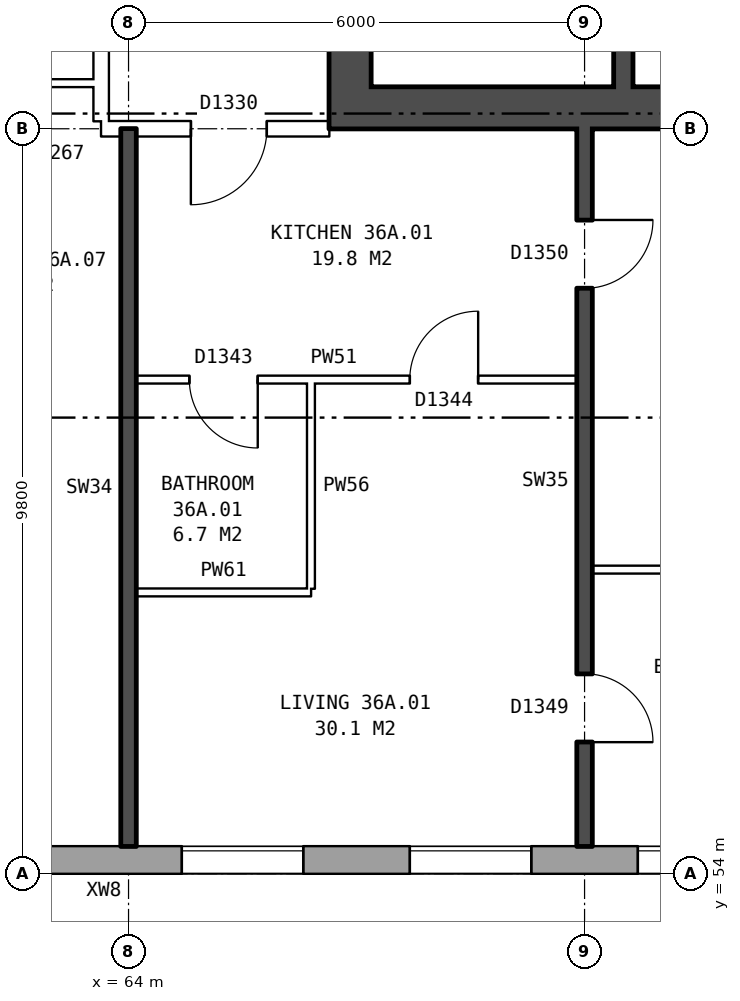
"""IFC4 building model, lengths in metres.
Left out: names, types, materials, properties, quantities, classifications, styles, units other than length and angle.
Written with IfcOpenShell. Run it as: python <this file> out.ifc"""

import sys

from ifc_helpers import new_model, si_unit, direction, frame, frame_2d, origin, place, context, subcontext, project, spatial, rectangle, extrude, element, fill, save


model = new_model("IFC4")
c1 = context("Model", 3, precision=1e-05, world=origin(), true_north=direction((0.0, 1.0)))
c2 = subcontext(c1, "Body", "Model", "MODEL_VIEW")
j1 = project(units=[si_unit("LENGTHUNIT", "METRE"), si_unit("PLANEANGLEUNIT", "RADIAN")], contexts=[c1])
p1 = place(None, origin())
s1 = spatial("IfcSite", under=j1, at=p1, CompositionType="ELEMENT")
p2 = place(p1, origin())
s2 = spatial("IfcBuilding", under=s1, at=p2, CompositionType="ELEMENT")
p3 = place(p2, frame((0.0, 0.0, 129.9)))
s3 = spatial("IfcBuildingStorey", under=s2, at=p3, CompositionType="ELEMENT", Elevation=129.9)
p4 = place(p3, frame((29.825, 54.18, 0.0), z_axis=(0.0, 0.0, 1.0), x_axis=(1.0, 0.0, 0.0)))
e1 = element("IfcWall", 1, at=p4, inside=s3, PredefinedType="STANDARD", context=c2, shape_type="SweptSolid", body=[
    extrude(rectangle(XDim=43.101, YDim=0.36, at=frame_2d((21.55, 0.0))), origin(), (0.0, 0.0, 1.0), 2.85),
])
p5 = place(p4, frame((1.875, 0.0, 0.8)))
e2 = element("IfcOpeningElement", 2, at=p5, cuts=e1, PredefinedType="OPENING", context=c2, shape_type="SweptSolid", body=[
    extrude(rectangle(XDim=1.6, YDim=1.8, at=frame_2d((0.8, 0.9))), frame((0.0, 0.19, 0.0), z_axis=(0.0, -1.0, 0.0), x_axis=(1.0, 0.0, 0.0)), (0.0, 0.0, 1.0), 0.38),
])
p6 = place(p4, frame((4.875, 0.0, 0.8)))
e3 = element("IfcOpeningElement", 3, at=p6, cuts=e1, PredefinedType="OPENING", context=c2, shape_type="SweptSolid", body=[
    extrude(rectangle(XDim=1.6, YDim=1.8, at=frame_2d((0.8, 0.9))), frame((0.0, 0.19, 0.0), z_axis=(0.0, -1.0, 0.0), x_axis=(1.0, 0.0, 0.0)), (0.0, 0.0, 1.0), 0.38),
])
p7 = place(p4, frame((6.775, 0.0, 0.8)))
e4 = element("IfcOpeningElement", 4, at=p7, cuts=e1, PredefinedType="OPENING", context=c2, shape_type="SweptSolid", body=[
    extrude(rectangle(XDim=1.6, YDim=1.8, at=frame_2d((0.8, 0.9))), frame((0.0, 0.19, 0.0), z_axis=(0.0, -1.0, 0.0), x_axis=(1.0, 0.0, 0.0)), (0.0, 0.0, 1.0), 0.38),
])
p8 = place(p4, frame((10.875, 0.0, 0.8)))
e5 = element("IfcOpeningElement", 5, at=p8, cuts=e1, PredefinedType="OPENING", context=c2, shape_type="SweptSolid", body=[
    extrude(rectangle(XDim=0.8, YDim=0.9, at=frame_2d((0.4, 0.45))), frame((0.0, 0.19, 0.0), z_axis=(0.0, -1.0, 0.0), x_axis=(1.0, 0.0, 0.0)), (0.0, 0.0, 1.0), 0.38),
])
p9 = place(p4, frame((13.875, 0.0, 0.8)))
e6 = element("IfcOpeningElement", 6, at=p9, cuts=e1, PredefinedType="OPENING", context=c2, shape_type="SweptSolid", body=[
    extrude(rectangle(XDim=1.6, YDim=1.8, at=frame_2d((0.8, 0.9))), frame((0.0, 0.19, 0.0), z_axis=(0.0, -1.0, 0.0), x_axis=(1.0, 0.0, 0.0)), (0.0, 0.0, 1.0), 0.38),
])
p10 = place(p4, frame((16.875, 0.0, 0.8)))
e7 = element("IfcOpeningElement", 7, at=p10, cuts=e1, PredefinedType="OPENING", context=c2, shape_type="SweptSolid", body=[
    extrude(rectangle(XDim=1.6, YDim=1.8, at=frame_2d((0.8, 0.9))), frame((0.0, 0.19, 0.0), z_axis=(0.0, -1.0, 0.0), x_axis=(1.0, 0.0, 0.0)), (0.0, 0.0, 1.0), 0.38),
])
p11 = place(p4, frame((19.875, 0.0, 0.8)))
e8 = element("IfcOpeningElement", 8, at=p11, cuts=e1, PredefinedType="OPENING", context=c2, shape_type="SweptSolid", body=[
    extrude(rectangle(XDim=1.6, YDim=1.8, at=frame_2d((0.8, 0.9))), frame((0.0, 0.19, 0.0), z_axis=(0.0, -1.0, 0.0), x_axis=(1.0, 0.0, 0.0)), (0.0, 0.0, 1.0), 0.38),
])
p12 = place(p4, frame((22.875, 0.0, 0.8)))
e9 = element("IfcOpeningElement", 9, at=p12, cuts=e1, PredefinedType="OPENING", context=c2, shape_type="SweptSolid", body=[
    extrude(rectangle(XDim=1.6, YDim=1.8, at=frame_2d((0.8, 0.9))), frame((0.0, 0.19, 0.0), z_axis=(0.0, -1.0, 0.0), x_axis=(1.0, 0.0, 0.0)), (0.0, 0.0, 1.0), 0.38),
])
p13 = place(p4, frame((25.875, 0.0, 0.8)))
e10 = element("IfcOpeningElement", 10, at=p13, cuts=e1, PredefinedType="OPENING", context=c2, shape_type="SweptSolid", body=[
    extrude(rectangle(XDim=1.6, YDim=1.8, at=frame_2d((0.8, 0.9))), frame((0.0, 0.19, 0.0), z_axis=(0.0, -1.0, 0.0), x_axis=(1.0, 0.0, 0.0)), (0.0, 0.0, 1.0), 0.38),
])
p14 = place(p4, frame((28.875, 0.0, 0.8)))
e11 = element("IfcOpeningElement", 11, at=p14, cuts=e1, PredefinedType="OPENING", context=c2, shape_type="SweptSolid", body=[
    extrude(rectangle(XDim=1.6, YDim=1.8, at=frame_2d((0.8, 0.9))), frame((0.0, 0.19, 0.0), z_axis=(0.0, -1.0, 0.0), x_axis=(1.0, 0.0, 0.0)), (0.0, 0.0, 1.0), 0.38),
])
p15 = place(p4, frame((31.325, 0.0, 0.15)))
e12 = element("IfcOpeningElement", 12, at=p15, cuts=e1, PredefinedType="OPENING", context=c2, shape_type="SweptSolid", body=[
    extrude(rectangle(XDim=0.6, YDim=1.8, at=frame_2d((0.3, 0.9))), frame((0.0, 0.19, 0.0), z_axis=(0.0, -1.0, 0.0), x_axis=(1.0, 0.0, 0.0)), (0.0, 0.0, 1.0), 0.38),
])
p16 = place(p4, frame((34.875, 0.0, 0.8)))
e13 = element("IfcOpeningElement", 13, at=p16, cuts=e1, PredefinedType="OPENING", context=c2, shape_type="SweptSolid", body=[
    extrude(rectangle(XDim=1.6, YDim=1.8, at=frame_2d((0.8, 0.9))), frame((0.0, 0.19, 0.0), z_axis=(0.0, -1.0, 0.0), x_axis=(1.0, 0.0, 0.0)), (0.0, 0.0, 1.0), 0.38),
])
p17 = place(p4, frame((37.875, 0.0, 0.8)))
e14 = element("IfcOpeningElement", 14, at=p17, cuts=e1, PredefinedType="OPENING", context=c2, shape_type="SweptSolid", body=[
    extrude(rectangle(XDim=1.6, YDim=1.8, at=frame_2d((0.8, 0.9))), frame((0.0, 0.19, 0.0), z_axis=(0.0, -1.0, 0.0), x_axis=(1.0, 0.0, 0.0)), (0.0, 0.0, 1.0), 0.38),
])
p18 = place(p4, frame((40.875, 0.0, 0.8)))
e15 = element("IfcOpeningElement", 15, at=p18, cuts=e1, PredefinedType="OPENING", context=c2, shape_type="SweptSolid", body=[
    extrude(rectangle(XDim=1.6, YDim=1.8, at=frame_2d((0.8, 0.9))), frame((0.0, 0.19, 0.0), z_axis=(0.0, -1.0, 0.0), x_axis=(1.0, 0.0, 0.0)), (0.0, 0.0, 1.0), 0.38),
])
p19 = place(p4, frame((8.675, 0.0, 1.3)))
e16 = element("IfcOpeningElement", 16, at=p19, cuts=e1, PredefinedType="OPENING", context=c2, shape_type="SweptSolid", body=[
    extrude(rectangle(XDim=0.6, YDim=1.2, at=frame_2d((0.3, 0.6))), frame((0.0, 0.19, 0.0), z_axis=(0.0, -1.0, 0.0), x_axis=(1.0, 0.0, 0.0)), (0.0, 0.0, 1.0), 0.38),
])
p20 = place(p4, frame((11.975, 0.0, 0.8)))
e17 = element("IfcOpeningElement", 17, at=p20, cuts=e1, PredefinedType="OPENING", context=c2, shape_type="SweptSolid", body=[
    extrude(rectangle(XDim=1.6, YDim=1.8, at=frame_2d((0.8, 0.9))), frame((0.0, 0.19, 0.0), z_axis=(0.0, -1.0, 0.0), x_axis=(1.0, 0.0, 0.0)), (0.0, 0.0, 1.0), 0.38),
])
p21 = place(p4, frame((32.225, 0.0, 0.25)))
e18 = element("IfcOpeningElement", 18, at=p21, cuts=e1, PredefinedType="OPENING", context=c2, shape_type="SweptSolid", body=[
    extrude(rectangle(XDim=0.6, YDim=0.9, at=frame_2d((0.3, 0.45))), frame((0.0, 0.19, 0.0), z_axis=(0.0, -1.0, 0.0), x_axis=(1.0, 0.0, 0.0)), (0.0, 0.0, 1.0), 0.38),
])
p22 = place(p3, frame((66.915, 63.8, 0.0), z_axis=(0.0, 0.0, 1.0), x_axis=(0.0, 1.0, 0.0)))
e19 = element("IfcWall", 19, at=p22, inside=s3, PredefinedType="SHEAR", context=c2, shape_type="SweptSolid", body=[
    extrude(rectangle(XDim=12.4, YDim=0.55, at=frame_2d((6.2, 0.0))), origin(), (0.0, 0.0, 1.0), 2.85),
])
p23 = place(p22, frame((1.325, 0.0, 0.0)))
e20 = element("IfcOpeningElement", 20, at=p23, cuts=e19, PredefinedType="OPENING", context=c2, shape_type="SweptSolid", body=[
    extrude(rectangle(XDim=1.1, YDim=2.1, at=frame_2d((0.55, 1.05))), frame((0.0, 0.285, 0.0), z_axis=(0.0, -1.0, 0.0), x_axis=(1.0, 0.0, 0.0)), (0.0, 0.0, 1.0), 0.57),
])
p24 = place(p22, frame((3.6, 0.0, 0.0)))
e21 = element("IfcOpeningElement", 21, at=p24, cuts=e19, PredefinedType="OPENING", context=c2, shape_type="SweptSolid", body=[
    extrude(rectangle(XDim=1.1, YDim=2.1, at=frame_2d((0.55, 1.05))), frame((0.0, 0.285, 0.0), z_axis=(0.0, -1.0, 0.0), x_axis=(1.0, 0.0, 0.0)), (0.0, 0.0, 1.0), 0.57),
])
p25 = place(p22, frame((5.8, 0.0, 0.0)))
e22 = element("IfcOpeningElement", 22, at=p25, cuts=e19, PredefinedType="OPENING", context=c2, shape_type="SweptSolid", body=[
    extrude(rectangle(XDim=1.1, YDim=2.1, at=frame_2d((0.55, 1.05))), frame((0.0, 0.285, 0.0), z_axis=(0.0, -1.0, 0.0), x_axis=(1.0, 0.0, 0.0)), (0.0, 0.0, 1.0), 0.57),
])
p26 = place(p22, frame((8.0, 0.0, 0.0)))
e23 = element("IfcOpeningElement", 23, at=p26, cuts=e19, PredefinedType="OPENING", context=c2, shape_type="SweptSolid", body=[
    extrude(rectangle(XDim=1.1, YDim=2.1, at=frame_2d((0.55, 1.05))), frame((0.0, 0.285, 0.0), z_axis=(0.0, -1.0, 0.0), x_axis=(1.0, 0.0, 0.0)), (0.0, 0.0, 1.0), 0.57),
])
p27 = place(p22, frame((9.9, 0.0, 0.0)))
e24 = element("IfcOpeningElement", 24, at=p27, cuts=e19, PredefinedType="OPENING", context=c2, shape_type="SweptSolid", body=[
    extrude(rectangle(XDim=1.1, YDim=2.1, at=frame_2d((0.55, 1.05))), frame((0.0, 0.285, 0.0), z_axis=(0.0, -1.0, 0.0), x_axis=(1.0, 0.0, 0.0)), (0.0, 0.0, 1.0), 0.57),
])
p28 = place(p3, frame((67.19, 64.075, 0.0), z_axis=(0.0, 0.0, 1.0), x_axis=(1.0, 0.0, 0.0)))
e25 = element("IfcWall", 25, at=p28, inside=s3, PredefinedType="SHEAR", context=c2, shape_type="SweptSolid", body=[
    extrude(rectangle(XDim=7.9, YDim=0.55, at=frame_2d((3.95, 0.0))), origin(), (0.0, 0.0, 1.0), 2.85),
])
p29 = place(p3, frame((70.51, 64.35, 0.0), z_axis=(0.0, 0.0, 1.0), x_axis=(0.0, 1.0, 0.0)))
e26 = element("IfcWall", 26, at=p29, inside=s3, PredefinedType="SHEAR", context=c2, shape_type="SweptSolid", body=[
    extrude(rectangle(XDim=2.375, YDim=0.25, at=frame_2d((1.188, 0.0))), origin(), (0.0, 0.0, 1.0), 2.85),
])
p30 = place(p3, frame((63.64, 63.9, 0.0), z_axis=(0.0, 0.0, 1.0), x_axis=(0.0, 1.0, 0.0)))
e27 = element("IfcWall", 27, at=p30, inside=s3, PredefinedType="PARTITIONING", context=c2, shape_type="SweptSolid", body=[
    extrude(rectangle(XDim=12.2, YDim=0.2, at=frame_2d((6.1, 0.0))), origin(), (0.0, 0.0, 1.0), 2.85),
])
p31 = place(p30, frame((5.1, 0.0, 0.0)))
e28 = element("IfcOpeningElement", 28, at=p31, cuts=e27, PredefinedType="OPENING", context=c2, shape_type="SweptSolid", body=[
    extrude(rectangle(XDim=2.0, YDim=2.1, at=frame_2d((1.0, 1.05))), frame((0.0, 0.11, 0.0), z_axis=(0.0, -1.0, 0.0), x_axis=(1.0, 0.0, 0.0)), (0.0, 0.0, 1.0), 0.22),
])
p32 = place(p3, frame((64.1, 57.7, 0.0), z_axis=(0.0, 0.0, 1.0), x_axis=(1.0, 0.0, 0.0)))
e29 = element("IfcWall", 29, at=p32, inside=s3, PredefinedType="PARTITIONING", context=c2, shape_type="SweptSolid", body=[
    extrude(rectangle(XDim=2.3, YDim=0.1, at=frame_2d((1.15, 0.0))), origin(), (0.0, 0.0, 1.0), 2.85),
])
p33 = place(p3, frame((70.1, 58.0, 0.0), z_axis=(0.0, 0.0, 1.0), x_axis=(1.0, 0.0, 0.0)))
e30 = element("IfcWall", 30, at=p33, inside=s3, PredefinedType="PARTITIONING", context=c2, shape_type="SweptSolid", body=[
    extrude(rectangle(XDim=5.54, YDim=0.1, at=frame_2d((2.77, 0.0))), origin(), (0.0, 0.0, 1.0), 2.85),
])
p34 = place(p3, frame((64.1, 60.5, 0.0), z_axis=(0.0, 0.0, 1.0), x_axis=(1.0, 0.0, 0.0)))
e31 = element("IfcWall", 31, at=p34, inside=s3, PredefinedType="PARTITIONING", context=c2, shape_type="SweptSolid", body=[
    extrude(rectangle(XDim=5.8, YDim=0.1, at=frame_2d((2.9, 0.0))), origin(), (0.0, 0.0, 1.0), 2.85),
])
p35 = place(p34, frame((3.6, 0.0, 0.0)))
e32 = element("IfcOpeningElement", 32, at=p35, cuts=e31, PredefinedType="OPENING", context=c2, shape_type="SweptSolid", body=[
    extrude(rectangle(XDim=0.9, YDim=2.1, at=frame_2d((0.45, 1.05))), frame((0.0, 0.06, 0.0), z_axis=(0.0, -1.0, 0.0), x_axis=(1.0, 0.0, 0.0)), (0.0, 0.0, 1.0), 0.12),
])
p36 = place(p34, frame((0.7, 0.0, 0.0)))
e33 = element("IfcOpeningElement", 33, at=p36, cuts=e31, PredefinedType="OPENING", context=c2, shape_type="SweptSolid", body=[
    extrude(rectangle(XDim=0.9, YDim=2.1, at=frame_2d((0.45, 1.05))), frame((0.0, 0.06, 0.0), z_axis=(0.0, -1.0, 0.0), x_axis=(1.0, 0.0, 0.0)), (0.0, 0.0, 1.0), 0.12),
])
p37 = place(p3, frame((63.64, 63.8, 0.0), z_axis=(0.0, 0.0, 1.0), x_axis=(1.0, 0.0, 0.0)))
e34 = element("IfcWall", 34, at=p37, inside=s3, PredefinedType="PARTITIONING", context=c2, shape_type="SweptSolid", body=[
    extrude(rectangle(XDim=3.0, YDim=0.2, at=frame_2d((1.5, 0.0))), origin(), (0.0, 0.0, 1.0), 2.85),
])
p38 = place(p37, frame((1.18, 0.0, 0.0)))
e35 = element("IfcOpeningElement", 35, at=p38, cuts=e34, PredefinedType="OPENING", context=c2, shape_type="SweptSolid", body=[
    extrude(rectangle(XDim=1.0, YDim=2.1, at=frame_2d((0.5, 1.05))), frame((0.0, 0.11, 0.0), z_axis=(0.0, -1.0, 0.0), x_axis=(1.0, 0.0, 0.0)), (0.0, 0.0, 1.0), 0.22),
])
p39 = place(p3, frame((61.0, 64.4, 0.0), z_axis=(0.0, 0.0, 1.0), x_axis=(1.0, 0.0, 0.0)))
e36 = element("IfcWall", 36, at=p39, inside=s3, PredefinedType="PARTITIONING", context=c2, shape_type="SweptSolid", body=[
    extrude(rectangle(XDim=2.64, YDim=0.1, at=frame_2d((1.32, 0.0))), origin(), (0.0, 0.0, 1.0), 2.85),
])
p40 = place(p3, frame((64.0, 54.36, 0.0), z_axis=(0.0, 0.0, 1.0), x_axis=(0.0, 1.0, 0.0)))
e37 = element("IfcWall", 37, at=p40, inside=s3, PredefinedType="SOLIDWALL", context=c2, shape_type="SweptSolid", body=[
    extrude(rectangle(XDim=9.44, YDim=0.2, at=frame_2d((4.72, 0.0))), origin(), (0.0, 0.0, 1.0), 2.85),
])
p41 = place(p3, frame((66.4, 57.75, 0.0), z_axis=(0.0, 0.0, 1.0), x_axis=(0.0, 1.0, 0.0)))
e38 = element("IfcWall", 38, at=p41, inside=s3, PredefinedType="PARTITIONING", context=c2, shape_type="SweptSolid", body=[
    extrude(rectangle(XDim=2.7, YDim=0.1, at=frame_2d((1.35, 0.0))), origin(), (0.0, 0.0, 1.0), 2.85),
])
p42 = place(p3, frame((70.0, 54.36, 0.0), z_axis=(0.0, 0.0, 1.0), x_axis=(0.0, 1.0, 0.0)))
e39 = element("IfcWall", 39, at=p42, inside=s3, PredefinedType="SOLIDWALL", context=c2, shape_type="SweptSolid", body=[
    extrude(rectangle(XDim=9.44, YDim=0.2, at=frame_2d((4.72, 0.0))), origin(), (0.0, 0.0, 1.0), 2.85),
])
p43 = place(p42, frame((1.37, 0.0, 0.0)))
e40 = element("IfcOpeningElement", 40, at=p43, cuts=e39, PredefinedType="OPENING", context=c2, shape_type="SweptSolid", body=[
    extrude(rectangle(XDim=0.9, YDim=2.1, at=frame_2d((0.45, 1.05))), frame((0.0, 0.11, 0.0), z_axis=(0.0, -1.0, 0.0), x_axis=(1.0, 0.0, 0.0)), (0.0, 0.0, 1.0), 0.22),
])
p44 = place(p42, frame((7.34, 0.0, 0.0)))
e41 = element("IfcOpeningElement", 41, at=p44, cuts=e39, PredefinedType="OPENING", context=c2, shape_type="SweptSolid", body=[
    extrude(rectangle(XDim=0.9, YDim=2.1, at=frame_2d((0.45, 1.05))), frame((0.0, 0.11, 0.0), z_axis=(0.0, -1.0, 0.0), x_axis=(1.0, 0.0, 0.0)), (0.0, 0.0, 1.0), 0.22),
])
p45 = place(p16, origin())
e42 = element("IfcWindow", 42, at=p45, inside=s3, PartitioningType="SINGLE_PANEL", PredefinedType="WINDOW", context=c2, shape_type="SweptSolid", body=[
    extrude(rectangle(XDim=1.6, YDim=1.8, at=frame_2d((0.8, 0.9))), frame((0.0, 0.15, 0.0), z_axis=(0.0, -1.0, 0.0), x_axis=(1.0, 0.0, 0.0)), (0.0, 0.0, 1.0), 0.06),
])
fill(e13, e42)
p46 = place(p17, origin())
e43 = element("IfcWindow", 43, at=p46, inside=s3, PartitioningType="SINGLE_PANEL", PredefinedType="WINDOW", context=c2, shape_type="SweptSolid", body=[
    extrude(rectangle(XDim=1.6, YDim=1.8, at=frame_2d((0.8, 0.9))), frame((0.0, 0.15, 0.0), z_axis=(0.0, -1.0, 0.0), x_axis=(1.0, 0.0, 0.0)), (0.0, 0.0, 1.0), 0.06),
])
fill(e14, e43)
p47 = place(p18, origin())
e44 = element("IfcWindow", 44, at=p47, inside=s3, PartitioningType="SINGLE_PANEL", PredefinedType="WINDOW", context=c2, shape_type="SweptSolid", body=[
    extrude(rectangle(XDim=1.6, YDim=1.8, at=frame_2d((0.8, 0.9))), frame((0.0, 0.15, 0.0), z_axis=(0.0, -1.0, 0.0), x_axis=(1.0, 0.0, 0.0)), (0.0, 0.0, 1.0), 0.06),
])
fill(e15, e44)
p48 = place(p43, frame((0.9, 0.0, 0.0), z_axis=(0.0, 0.0, 1.0), x_axis=(-1.0, 0.0, 0.0)))
e45 = element("IfcDoor", 45, at=p48, inside=s3, OperationType="SINGLE_SWING_RIGHT", PredefinedType="DOOR", context=c2, shape_type="SweptSolid", body=[
    extrude(rectangle(XDim=0.9, YDim=2.1, at=frame_2d((0.45, 1.05))), frame((0.0, 0.025, 0.0), z_axis=(0.0, -1.0, 0.0), x_axis=(1.0, 0.0, 0.0)), (0.0, 0.0, 1.0), 0.05),
])
fill(e40, e45)
p49 = place(p44, frame((0.9, 0.0, 0.0), z_axis=(0.0, 0.0, 1.0), x_axis=(-1.0, 0.0, 0.0)))
e46 = element("IfcDoor", 46, at=p49, inside=s3, OperationType="SINGLE_SWING_LEFT", PredefinedType="DOOR", context=c2, shape_type="SweptSolid", body=[
    extrude(rectangle(XDim=0.9, YDim=2.1, at=frame_2d((0.45, 1.05))), frame((0.0, 0.025, 0.0), z_axis=(0.0, -1.0, 0.0), x_axis=(1.0, 0.0, 0.0)), (0.0, 0.0, 1.0), 0.05),
])
fill(e41, e46)
p50 = place(p38, frame((1.0, 0.0, 0.0), z_axis=(0.0, 0.0, 1.0), x_axis=(-1.0, 0.0, 0.0)))
e47 = element("IfcDoor", 47, at=p50, inside=s3, OperationType="SINGLE_SWING_RIGHT", PredefinedType="DOOR", context=c2, shape_type="SweptSolid", body=[
    extrude(rectangle(XDim=1.0, YDim=2.1, at=frame_2d((0.5, 1.05))), frame((0.0, 0.025, 0.0), z_axis=(0.0, -1.0, 0.0), x_axis=(1.0, 0.0, 0.0)), (0.0, 0.0, 1.0), 0.05),
])
fill(e35, e47)
p51 = place(p35, origin())
e48 = element("IfcDoor", 48, at=p51, inside=s3, OperationType="SINGLE_SWING_RIGHT", PredefinedType="DOOR", context=c2, shape_type="SweptSolid", body=[
    extrude(rectangle(XDim=0.9, YDim=2.1, at=frame_2d((0.45, 1.05))), frame((0.0, 0.025, 0.0), z_axis=(0.0, -1.0, 0.0), x_axis=(1.0, 0.0, 0.0)), (0.0, 0.0, 1.0), 0.05),
])
fill(e32, e48)
p52 = place(p36, frame((0.9, 0.0, 0.0), z_axis=(0.0, 0.0, 1.0), x_axis=(-1.0, 0.0, 0.0)))
e49 = element("IfcDoor", 49, at=p52, inside=s3, OperationType="SINGLE_SWING_LEFT", PredefinedType="DOOR", context=c2, shape_type="SweptSolid", body=[
    extrude(rectangle(XDim=0.9, YDim=2.1, at=frame_2d((0.45, 1.05))), frame((0.0, 0.025, 0.0), z_axis=(0.0, -1.0, 0.0), x_axis=(1.0, 0.0, 0.0)), (0.0, 0.0, 1.0), 0.05),
])
fill(e33, e49)
save(model, sys.argv[1])
